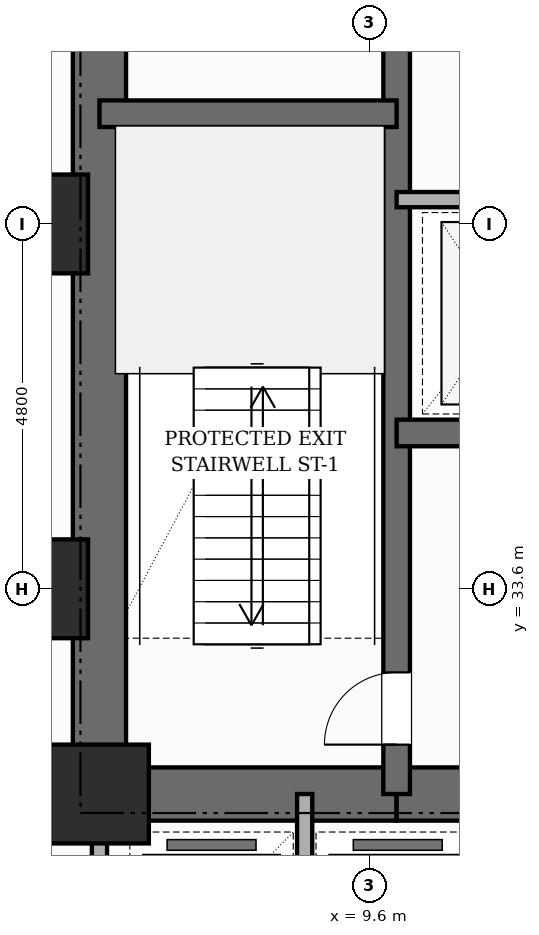
"""IFC4 building model, lengths in metres.
Left out: names, types, materials, properties, quantities, classifications, styles, units other than length and angle.
Written with IfcOpenShell. Run it as: python <this file> out.ifc"""

import sys

from ifc_helpers import new_model, si_unit, direction, frame, frame_2d, origin, origin_2d, place, context, subcontext, project, spatial, rectangle, extrude, element, fill, save


model = new_model("IFC4")
c1 = context("Model", 3, precision=1e-05, world=origin(), true_north=direction((0.0, 1.0)))
c2 = subcontext(c1, "Body", "Model", "MODEL_VIEW")
j1 = project(units=[si_unit("LENGTHUNIT", "METRE"), si_unit("PLANEANGLEUNIT", "RADIAN")], contexts=[c1])
p1 = place(None, origin())
s1 = spatial("IfcSite", under=j1, at=p1, CompositionType="ELEMENT")
p2 = place(p1, origin())
s2 = spatial("IfcBuilding", under=s1, at=p2, CompositionType="ELEMENT")
p3 = place(p2, frame((0.0, 0.0, 5.2)))
s3 = spatial("IfcBuildingStorey", under=s2, at=p3, CompositionType="ELEMENT", Elevation=5.2)
p4 = place(p3, frame((6.05, 30.55, 0.0), z_axis=(0.0, 0.0, 1.0), x_axis=(0.0, 1.0, 0.0)))
e1 = element("IfcWall", 1, at=p4, inside=s3, PredefinedType="SHEAR", context=c2, shape_type="SweptSolid", body=[
    extrude(rectangle(XDim=15.6, YDim=0.7, at=frame_2d((7.8, 0.0))), origin(), (0.0, 0.0, 1.0), 4.8),
])
p5 = place(p3, frame((6.05, 30.9, 0.0), z_axis=(0.0, 0.0, 1.0), x_axis=(1.0, 0.0, 0.0)))
e2 = element("IfcWall", 2, at=p5, inside=s3, PredefinedType="SHEAR", context=c2, shape_type="SweptSolid", body=[
    extrude(rectangle(XDim=3.91, YDim=0.7, at=frame_2d((1.955, 0.0))), origin(), (0.0, 0.0, 1.0), 4.8),
])
p6 = place(p3, frame((9.96, 30.9, 0.0), z_axis=(0.0, 0.0, 1.0), x_axis=(1.0, 0.0, 0.0)))
e3 = element("IfcWall", 3, at=p6, inside=s3, PredefinedType="SHEAR", context=c2, shape_type="SweptSolid", body=[
    extrude(rectangle(XDim=8.88, YDim=0.7, at=frame_2d((4.44, 0.0))), origin(), (0.0, 0.0, 1.0), 4.8),
])
p7 = place(p6, frame((4.09, 0.0, 0.0)))
e4 = element("IfcOpeningElement", 4, at=p7, cuts=e3, PredefinedType="OPENING", context=c2, shape_type="SweptSolid", body=[
    extrude(rectangle(XDim=1.0, YDim=2.15, at=frame_2d((0.5, 1.075))), frame((0.0, 0.36, 0.0), z_axis=(0.0, -1.0, 0.0), x_axis=(1.0, 0.0, 0.0)), (0.0, 0.0, 1.0), 0.72),
])
p8 = place(p3, frame((9.96, 30.9, 0.0), z_axis=(0.0, 0.0, 1.0), x_axis=(0.0, 1.0, 0.0)))
e5 = element("IfcWall", 5, at=p8, inside=s3, PredefinedType="SHEAR", context=c2, shape_type="SweptSolid", body=[
    extrude(rectangle(XDim=14.9, YDim=0.35, at=frame_2d((7.45, 0.0))), origin(), (0.0, 0.0, 1.0), 4.8),
])
p9 = place(p8, frame((0.65, 0.0, 0.0)))
e6 = element("IfcOpeningElement", 6, at=p9, cuts=e5, PredefinedType="OPENING", context=c2, shape_type="SweptSolid", body=[
    extrude(rectangle(XDim=0.95, YDim=2.1, at=frame_2d((0.475, 1.05))), frame((0.0, 0.185, 0.0), z_axis=(0.0, -1.0, 0.0), x_axis=(1.0, 0.0, 0.0)), (0.0, 0.0, 1.0), 0.37),
])
p10 = place(p8, frame((10.45, 0.0, 0.0)))
e7 = element("IfcOpeningElement", 7, at=p10, cuts=e5, PredefinedType="OPENING", context=c2, shape_type="SweptSolid", body=[
    extrude(rectangle(XDim=1.0, YDim=2.15, at=frame_2d((0.5, 1.075))), frame((0.0, 0.185, 0.0), z_axis=(0.0, -1.0, 0.0), x_axis=(1.0, 0.0, 0.0)), (0.0, 0.0, 1.0), 0.37),
])
p11 = place(p3, frame((6.05, 39.85, 0.0), z_axis=(0.0, 0.0, 1.0), x_axis=(1.0, 0.0, 0.0)))
e8 = element("IfcWall", 8, at=p11, inside=s3, PredefinedType="SHEAR", context=c2, shape_type="SweptSolid", body=[
    extrude(rectangle(XDim=3.91, YDim=0.35, at=frame_2d((1.955, 0.0))), origin(), (0.0, 0.0, 1.0), 4.8),
])
p12 = place(p3, frame((9.96, 35.65, 0.0), z_axis=(0.0, 0.0, 1.0), x_axis=(1.0, 0.0, 0.0)))
e9 = element("IfcWall", 9, at=p12, inside=s3, PredefinedType="SHEAR", context=c2, shape_type="SweptSolid", body=[
    extrude(rectangle(XDim=8.88, YDim=0.35, at=frame_2d((4.44, 0.0))), origin(), (0.0, 0.0, 1.0), 4.8),
])
p13 = place(p12, frame((0.84, 0.0, 0.0)))
e10 = element("IfcOpeningElement", 10, at=p13, cuts=e9, PredefinedType="OPENING", context=c2, shape_type="SweptSolid", body=[
    extrude(rectangle(XDim=1.1, YDim=2.15, at=frame_2d((0.55, 1.075))), frame((0.0, 0.185, 0.0), z_axis=(0.0, -1.0, 0.0), x_axis=(1.0, 0.0, 0.0)), (0.0, 0.0, 1.0), 0.37),
])
p14 = place(p12, frame((5.24, 0.0, 0.0)))
e11 = element("IfcOpeningElement", 11, at=p14, cuts=e9, PredefinedType="OPENING", context=c2, shape_type="SweptSolid", body=[
    extrude(rectangle(XDim=1.1, YDim=2.15, at=frame_2d((0.55, 1.075))), frame((0.0, 0.185, 0.0), z_axis=(0.0, -1.0, 0.0), x_axis=(1.0, 0.0, 0.0)), (0.0, 0.0, 1.0), 0.37),
])
p15 = place(p12, frame((7.5, 0.0, 0.0)))
e12 = element("IfcOpeningElement", 12, at=p15, cuts=e9, PredefinedType="OPENING", context=c2, shape_type="SweptSolid", body=[
    extrude(rectangle(XDim=0.88, YDim=2.1, at=frame_2d((0.44, 1.05))), frame((0.0, 0.185, 0.0), z_axis=(0.0, -1.0, 0.0), x_axis=(1.0, 0.0, 0.0)), (0.0, 0.0, 1.0), 0.37),
])
for number, where, z_axis, x_axis in (
    (13, (5.25, 33.6, 0.0), (0.0, 0.0, 1.0), (1.0, 0.0, 0.0)),
    (14, (5.25, 38.4, 0.0), (0.0, 0.0, 1.0), (1.0, 0.0, 0.0)),
    (15, (6.05, 30.9, 0.0), (0.0, 0.0, 1.0), (1.0, 0.0, 0.0)),
):
    element("IfcColumn", number, at=place(p3, frame(where, z_axis=z_axis, x_axis=x_axis)), inside=s3, PredefinedType="COLUMN", context=c2, shape_type="SweptSolid", body=[
        extrude(rectangle(XDim=1.3, YDim=1.3, at=origin_2d()), origin(), (0.0, 0.0, 1.0), 4.8),
    ])
p16 = place(p3, frame((9.96, 38.72, 0.0), z_axis=(0.0, 0.0, 1.0), x_axis=(1.0, 0.0, 0.0)))
e16 = element("IfcWall", 16, at=p16, inside=s3, PredefinedType="POLYGONAL", context=c2, shape_type="SweptSolid", body=[
    extrude(rectangle(XDim=7.06, YDim=0.2, at=frame_2d((3.53, 0.0))), origin(), (0.0, 0.0, 1.0), 4.52),
])
p17 = place(p3, frame((6.05, 27.9, 0.0), z_axis=(0.0, 0.0, 1.0), x_axis=(0.0, 1.0, 0.0)))
e17 = element("IfcWall", 17, at=p17, inside=s3, PredefinedType="POLYGONAL", context=c2, shape_type="SweptSolid", body=[
    extrude(rectangle(XDim=3.0, YDim=0.2, at=frame_2d((1.5, 0.0))), origin(), (0.0, 0.0, 1.0), 4.52),
])
p18 = place(p3, frame((8.75, 28.0, 0.0), z_axis=(0.0, 0.0, 1.0), x_axis=(0.0, 1.0, 0.0)))
e18 = element("IfcWall", 18, at=p18, inside=s3, PredefinedType="POLYGONAL", context=c2, shape_type="SweptSolid", body=[
    extrude(rectangle(XDim=2.9, YDim=0.2, at=frame_2d((1.45, 0.0))), origin(), (0.0, 0.0, 1.0), 4.52),
])
p19 = place(p9, origin())
e19 = element("IfcDoor", 19, at=p19, inside=s3, OperationType="SINGLE_SWING_LEFT", PredefinedType="DOOR", context=c2, shape_type="SweptSolid", body=[
    extrude(rectangle(XDim=0.95, YDim=2.1, at=frame_2d((0.475, 1.05))), frame((0.0, 0.025, 0.0), z_axis=(0.0, -1.0, 0.0), x_axis=(1.0, 0.0, 0.0)), (0.0, 0.0, 1.0), 0.05),
])
fill(e6, e19)
save(model, sys.argv[1])
